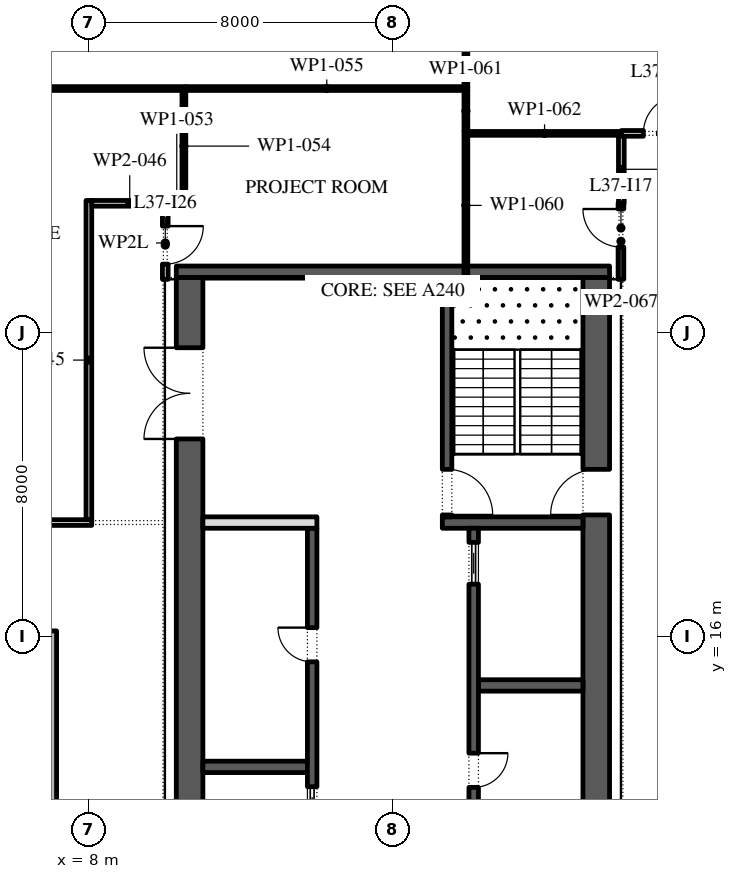
"""IFC4 building model, lengths in metres.
Left out: names, types, materials, properties, quantities, classifications, styles, units other than length and angle.
Written with IfcOpenShell. Run it as: python <this file> out.ifc"""

import sys

from ifc_helpers import new_model, si_unit, direction, frame, frame_2d, origin, place, context, subcontext, project, spatial, polyline, rectangle, outline, extrude, element, fill, save


model = new_model("IFC4")
c1 = context("Model", 3, precision=1e-05, world=origin(), true_north=direction((0.0, 1.0)))
c2 = subcontext(c1, "Body", "Model", "MODEL_VIEW")
j1 = project(units=[si_unit("LENGTHUNIT", "METRE"), si_unit("PLANEANGLEUNIT", "RADIAN")], contexts=[c1])
p1 = place(None, origin())
s1 = spatial("IfcSite", under=j1, at=p1, CompositionType="ELEMENT")
p2 = place(p1, origin())
s2 = spatial("IfcBuilding", under=s1, at=p2, CompositionType="ELEMENT")
p3 = place(p2, frame((0.0, 0.0, 171.6)))
s3 = spatial("IfcBuildingStorey", under=s2, at=p3, CompositionType="ELEMENT", Elevation=171.6)
p4 = place(p3, origin())
e1 = element("IfcWall", 1, at=p4, inside=s3, PredefinedType="STANDARD", context=c2, shape_type="SweptSolid", body=[
    extrude(outline(polyline([(-7.15, -2.15), (7.15, -2.15), (7.15, 16.15), (-7.15, 16.15), (-7.15, -2.15)]), holes=[polyline([(-7.0, -2.0), (-7.0, 16.0), (7.0, 16.0), (7.0, -2.0), (-7.0, -2.0)])]), origin(), (0.0, 0.0, 1.0), 4.0),
])
p5 = place(p3, frame((33.157, -5.092, 0.0), z_axis=(0.0, 0.0, 1.0), x_axis=(-0.224950279389, 0.974370243697, 0.0)))
e2 = element("IfcWall", 2, at=p5, inside=s3, PredefinedType="STANDARD", context=c2, shape_type="SweptSolid", body=[
    extrude(rectangle(XDim=49.5, YDim=0.3, at=frame_2d((24.75, 0.0))), origin(), (0.0, 0.0, 1.0), 4.0),
])
p6 = place(p5, frame((2.207, 0.0, 0.0)))
e3 = element("IfcOpeningElement", 3, at=p6, cuts=e2, PredefinedType="OPENING", context=c2, shape_type="SweptSolid", body=[
    extrude(rectangle(XDim=2.4, YDim=3.125, at=frame_2d((1.2, 1.562))), frame((0.0, 0.16, 0.0), z_axis=(0.0, -1.0, 0.0), x_axis=(1.0, 0.0, 0.0)), (0.0, 0.0, 1.0), 0.32),
])
p7 = place(p5, frame((8.121, 0.0, 0.45)))
e4 = element("IfcOpeningElement", 4, at=p7, cuts=e2, PredefinedType="OPENING", context=c2, shape_type="SweptSolid", body=[
    extrude(rectangle(XDim=4.5, YDim=2.875, at=frame_2d((2.25, 1.438))), frame((0.0, 0.16, 0.0), z_axis=(0.0, -1.0, 0.0), x_axis=(1.0, 0.0, 0.0)), (0.0, 0.0, 1.0), 0.32),
])
p8 = place(p5, frame((15.236, 0.0, 0.45)))
e5 = element("IfcOpeningElement", 5, at=p8, cuts=e2, PredefinedType="OPENING", context=c2, shape_type="SweptSolid", body=[
    extrude(rectangle(XDim=4.5, YDim=2.875, at=frame_2d((2.25, 1.438))), frame((0.0, 0.16, 0.0), z_axis=(0.0, -1.0, 0.0), x_axis=(1.0, 0.0, 0.0)), (0.0, 0.0, 1.0), 0.32),
])
p9 = place(p5, frame((22.35, 0.0, 0.45)))
e6 = element("IfcOpeningElement", 6, at=p9, cuts=e2, PredefinedType="OPENING", context=c2, shape_type="SweptSolid", body=[
    extrude(rectangle(XDim=4.5, YDim=3.0, at=frame_2d((2.25, 1.5))), frame((0.0, 0.16, 0.0), z_axis=(0.0, -1.0, 0.0), x_axis=(1.0, 0.0, 0.0)), (0.0, 0.0, 1.0), 0.32),
])
p10 = place(p5, frame((30.514, 0.0, 0.0)))
e7 = element("IfcOpeningElement", 7, at=p10, cuts=e2, PredefinedType="OPENING", context=c2, shape_type="SweptSolid", body=[
    extrude(rectangle(XDim=2.4, YDim=3.45, at=frame_2d((1.2, 1.725))), frame((0.0, 0.16, 0.0), z_axis=(0.0, -1.0, 0.0), x_axis=(1.0, 0.0, 0.0)), (0.0, 0.0, 1.0), 0.32),
])
p11 = place(p5, frame((36.579, 0.0, 0.45)))
e8 = element("IfcOpeningElement", 8, at=p11, cuts=e2, PredefinedType="OPENING", context=c2, shape_type="SweptSolid", body=[
    extrude(rectangle(XDim=4.5, YDim=3.05, at=frame_2d((2.25, 1.525))), frame((0.0, 0.16, 0.0), z_axis=(0.0, -1.0, 0.0), x_axis=(1.0, 0.0, 0.0)), (0.0, 0.0, 1.0), 0.32),
])
p12 = place(p5, frame((43.693, 0.0, 0.45)))
e9 = element("IfcOpeningElement", 9, at=p12, cuts=e2, PredefinedType="OPENING", context=c2, shape_type="SweptSolid", body=[
    extrude(rectangle(XDim=4.5, YDim=3.05, at=frame_2d((2.25, 1.525))), frame((0.0, 0.16, 0.0), z_axis=(0.0, -1.0, 0.0), x_axis=(1.0, 0.0, 0.0)), (0.0, 0.0, 1.0), 0.32),
])
p13 = place(p3, frame((21.35, -2.45, 0.0), z_axis=(0.0, 0.0, 1.0), x_axis=(0.0, 1.0, 0.0)))
e10 = element("IfcWall", 10, at=p13, inside=s3, PredefinedType="SHEAR", context=c2, shape_type="SweptSolid", body=[
    extrude(rectangle(XDim=27.9, YDim=0.7, at=frame_2d((13.95, 0.0))), origin(), (0.0, 0.0, 1.0), 4.0),
])
p14 = place(p13, frame((5.05, 0.0, 0.0)))
e11 = element("IfcOpeningElement", 11, at=p14, cuts=e10, PredefinedType="OPENING", context=c2, shape_type="SweptSolid", body=[
    extrude(rectangle(XDim=1.2, YDim=2.1, at=frame_2d((0.6, 1.05))), frame((0.0, 0.36, 0.0), z_axis=(0.0, -1.0, 0.0), x_axis=(1.0, 0.0, 0.0)), (0.0, 0.0, 1.0), 0.72),
])
p15 = place(p13, frame((21.65, 0.0, 0.0)))
e12 = element("IfcOpeningElement", 12, at=p15, cuts=e10, PredefinedType="OPENING", context=c2, shape_type="SweptSolid", body=[
    extrude(rectangle(XDim=1.2, YDim=2.1, at=frame_2d((0.6, 1.05))), frame((0.0, 0.36, 0.0), z_axis=(0.0, -1.0, 0.0), x_axis=(1.0, 0.0, 0.0)), (0.0, 0.0, 1.0), 0.72),
])
p16 = place(p3, frame((10.65, -2.45, 0.0), z_axis=(0.0, 0.0, 1.0), x_axis=(0.0, 1.0, 0.0)))
e13 = element("IfcWall", 13, at=p16, inside=s3, PredefinedType="SHEAR", context=c2, shape_type="SweptSolid", body=[
    extrude(rectangle(XDim=27.9, YDim=0.7, at=frame_2d((13.95, 0.0))), origin(), (0.0, 0.0, 1.0), 4.0),
])
p17 = place(p16, frame((23.65, 0.0, 0.0)))
e14 = element("IfcOpeningElement", 14, at=p17, cuts=e13, PredefinedType="OPENING", context=c2, shape_type="SweptSolid", body=[
    extrude(rectangle(XDim=2.4, YDim=2.1, at=frame_2d((1.2, 1.05))), frame((0.0, 0.36, 0.0), z_axis=(0.0, -1.0, 0.0), x_axis=(1.0, 0.0, 0.0)), (0.0, 0.0, 1.0), 0.72),
])
p18 = place(p16, frame((0.788, 0.0, 0.0)))
e15 = element("IfcOpeningElement", 15, at=p18, cuts=e13, PredefinedType="OPENING", context=c2, shape_type="SweptSolid", body=[
    extrude(rectangle(XDim=0.9, YDim=2.1, at=frame_2d((0.45, 1.05))), frame((0.0, 0.36, 0.0), z_axis=(0.0, -1.0, 0.0), x_axis=(1.0, 0.0, 0.0)), (0.0, 0.0, 1.0), 0.72),
])
p19 = place(p16, frame((3.962, 0.0, 0.0)))
e16 = element("IfcOpeningElement", 16, at=p19, cuts=e13, PredefinedType="OPENING", context=c2, shape_type="SweptSolid", body=[
    extrude(rectangle(XDim=1.0, YDim=2.1, at=frame_2d((0.5, 1.05))), frame((0.0, 0.36, 0.0), z_axis=(0.0, -1.0, 0.0), x_axis=(1.0, 0.0, 0.0)), (0.0, 0.0, 1.0), 0.72),
])
p20 = place(p3, frame((10.3, 25.6, 0.0), z_axis=(0.0, 0.0, 1.0), x_axis=(1.0, 0.0, 0.0)))
e17 = element("IfcWall", 17, at=p20, inside=s3, PredefinedType="SHEAR", context=c2, shape_type="SweptSolid", body=[
    extrude(rectangle(XDim=11.4, YDim=0.3, at=frame_2d((5.7, 0.0))), origin(), (0.0, 0.0, 1.0), 4.0),
])
p21 = place(p3, frame((17.3, 19.0, 0.0), z_axis=(0.0, 0.0, 1.0), x_axis=(1.0, 0.0, 0.0)))
e18 = element("IfcWall", 18, at=p21, inside=s3, PredefinedType="SHEAR", context=c2, shape_type="SweptSolid", body=[
    extrude(rectangle(XDim=3.7, YDim=0.3, at=frame_2d((1.85, 0.0))), origin(), (0.0, 0.0, 1.0), 4.0),
])
p22 = place(p3, frame((17.425, 19.15, 0.0), z_axis=(0.0, 0.0, 1.0), x_axis=(0.0, 1.0, 0.0)))
e19 = element("IfcWall", 19, at=p22, inside=s3, PredefinedType="SHEAR", context=c2, shape_type="SweptSolid", body=[
    extrude(rectangle(XDim=6.3, YDim=0.25, at=frame_2d((3.15, 0.0))), origin(), (0.0, 0.0, 1.0), 4.0),
])
p23 = place(p22, frame((0.05, 0.0, 0.0)))
e20 = element("IfcOpeningElement", 20, at=p23, cuts=e19, PredefinedType="OPENING", context=c2, shape_type="SweptSolid", body=[
    extrude(rectangle(XDim=1.2, YDim=2.1, at=frame_2d((0.6, 1.05))), frame((0.0, 0.135, 0.0), z_axis=(0.0, -1.0, 0.0), x_axis=(1.0, 0.0, 0.0)), (0.0, 0.0, 1.0), 0.27),
])
p24 = place(p3, frame((18.25, 14.714, 0.0), z_axis=(0.0, 0.0, 1.0), x_axis=(1.0, 0.0, 0.0)))
e21 = element("IfcWall", 21, at=p24, inside=s3, PredefinedType="SHEAR", context=c2, shape_type="SweptSolid", body=[
    extrude(rectangle(XDim=2.75, YDim=0.3, at=frame_2d((1.375, 0.0))), origin(), (0.0, 0.0, 1.0), 4.0),
])
p25 = place(p3, frame((18.125, 4.15, 0.0), z_axis=(0.0, 0.0, 1.0), x_axis=(0.0, 1.0, 0.0)))
e22 = element("IfcWall", 22, at=p25, inside=s3, PredefinedType="SHEAR", context=c2, shape_type="SweptSolid", body=[
    extrude(rectangle(XDim=14.7, YDim=0.25, at=frame_2d((7.35, 0.0))), origin(), (0.0, 0.0, 1.0), 4.0),
])
p26 = place(p25, frame((3.746, 0.0, 0.0)))
e23 = element("IfcOpeningElement", 23, at=p26, cuts=e22, PredefinedType="OPENING", context=c2, shape_type="SweptSolid", body=[
    extrude(rectangle(XDim=0.9, YDim=2.1, at=frame_2d((0.45, 1.05))), frame((0.0, 0.135, 0.0), z_axis=(0.0, -1.0, 0.0), x_axis=(1.0, 0.0, 0.0)), (0.0, 0.0, 1.0), 0.27),
])
p27 = place(p25, frame((7.882, 0.0, 0.0)))
e24 = element("IfcOpeningElement", 24, at=p27, cuts=e22, PredefinedType="OPENING", context=c2, shape_type="SweptSolid", body=[
    extrude(rectangle(XDim=0.9, YDim=2.1, at=frame_2d((0.45, 1.05))), frame((0.0, 0.135, 0.0), z_axis=(0.0, -1.0, 0.0), x_axis=(1.0, 0.0, 0.0)), (0.0, 0.0, 1.0), 0.27),
])
p28 = place(p25, frame((0.371, 0.0, 0.0)))
e25 = element("IfcOpeningElement", 25, at=p28, cuts=e22, PredefinedType="OPENING", context=c2, shape_type="SweptSolid", body=[
    extrude(rectangle(XDim=1.1, YDim=2.1, at=frame_2d((0.55, 1.05))), frame((0.0, 0.135, 0.0), z_axis=(0.0, -1.0, 0.0), x_axis=(1.0, 0.0, 0.0)), (0.0, 0.0, 1.0), 0.27),
])
p29 = place(p25, frame((13.229, 0.0, 0.0)))
e26 = element("IfcOpeningElement", 26, at=p29, cuts=e22, PredefinedType="OPENING", context=c2, shape_type="SweptSolid", body=[
    extrude(rectangle(XDim=1.1, YDim=2.1, at=frame_2d((0.55, 1.05))), frame((0.0, 0.135, 0.0), z_axis=(0.0, -1.0, 0.0), x_axis=(1.0, 0.0, 0.0)), (0.0, 0.0, 1.0), 0.27),
])
p30 = place(p3, frame((11.0, 12.571, 0.0), z_axis=(0.0, 0.0, 1.0), x_axis=(1.0, 0.0, 0.0)))
e27 = element("IfcWall", 27, at=p30, inside=s3, PredefinedType="SHEAR", context=c2, shape_type="SweptSolid", body=[
    extrude(rectangle(XDim=2.75, YDim=0.3, at=frame_2d((1.375, 0.0))), origin(), (0.0, 0.0, 1.0), 4.0),
])
p31 = place(p3, frame((13.875, -2.45, 0.0), z_axis=(0.0, 0.0, 1.0), x_axis=(0.0, 1.0, 0.0)))
e28 = element("IfcWall", 28, at=p31, inside=s3, PredefinedType="SHEAR", context=c2, shape_type="SweptSolid", body=[
    extrude(rectangle(XDim=21.3, YDim=0.25, at=frame_2d((10.65, 0.0))), origin(), (0.0, 0.0, 1.0), 4.0),
])
p32 = place(p31, frame((17.786, 0.0, 0.0)))
e29 = element("IfcOpeningElement", 29, at=p32, cuts=e28, PredefinedType="OPENING", context=c2, shape_type="SweptSolid", body=[
    extrude(rectangle(XDim=0.9, YDim=2.1, at=frame_2d((0.45, 1.05))), frame((0.0, 0.135, 0.0), z_axis=(0.0, -1.0, 0.0), x_axis=(1.0, 0.0, 0.0)), (0.0, 0.0, 1.0), 0.27),
])
p33 = place(p31, frame((6.971, 0.0, 0.0)))
e30 = element("IfcOpeningElement", 30, at=p33, cuts=e28, PredefinedType="OPENING", context=c2, shape_type="SweptSolid", body=[
    extrude(rectangle(XDim=1.1, YDim=2.1, at=frame_2d((0.55, 1.05))), frame((0.0, 0.135, 0.0), z_axis=(0.0, -1.0, 0.0), x_axis=(1.0, 0.0, 0.0)), (0.0, 0.0, 1.0), 0.27),
])
p34 = place(p31, frame((9.114, 0.0, 0.0)))
e31 = element("IfcOpeningElement", 31, at=p34, cuts=e28, PredefinedType="OPENING", context=c2, shape_type="SweptSolid", body=[
    extrude(rectangle(XDim=1.1, YDim=2.1, at=frame_2d((0.55, 1.05))), frame((0.0, 0.135, 0.0), z_axis=(0.0, -1.0, 0.0), x_axis=(1.0, 0.0, 0.0)), (0.0, 0.0, 1.0), 0.27),
])
p35 = place(p31, frame((11.257, 0.0, 0.0)))
e32 = element("IfcOpeningElement", 32, at=p35, cuts=e28, PredefinedType="OPENING", context=c2, shape_type="SweptSolid", body=[
    extrude(rectangle(XDim=1.1, YDim=2.1, at=frame_2d((0.55, 1.05))), frame((0.0, 0.135, 0.0), z_axis=(0.0, -1.0, 0.0), x_axis=(1.0, 0.0, 0.0)), (0.0, 0.0, 1.0), 0.27),
])
p36 = place(p31, frame((13.4, 0.0, 0.0)))
e33 = element("IfcOpeningElement", 33, at=p36, cuts=e28, PredefinedType="OPENING", context=c2, shape_type="SweptSolid", body=[
    extrude(rectangle(XDim=1.1, YDim=2.1, at=frame_2d((0.55, 1.05))), frame((0.0, 0.135, 0.0), z_axis=(0.0, -1.0, 0.0), x_axis=(1.0, 0.0, 0.0)), (0.0, 0.0, 1.0), 0.27),
])
p37 = place(p3, frame((11.0, 19.0, 0.0), z_axis=(0.0, 0.0, 1.0), x_axis=(1.0, 0.0, 0.0)))
e34 = element("IfcWall", 34, at=p37, inside=s3, PredefinedType="PARTITIONING", context=c2, shape_type="SweptSolid", body=[
    extrude(rectangle(XDim=3.0, YDim=0.3, at=frame_2d((1.5, 0.0))), origin(), (0.0, 0.0, 1.0), 4.0),
])
p38 = place(p3, frame((1.025, 19.0, 0.0), z_axis=(0.0, 0.0, 1.0), x_axis=(1.0, 0.0, 0.0)))
e35 = element("IfcWall", 35, at=p38, inside=s3, PredefinedType="PARTITIONING", context=c2, shape_type="SweptSolid", body=[
    extrude(rectangle(XDim=7.05, YDim=0.15, at=frame_2d((3.525, 0.0))), origin(), (0.0, 0.0, 1.0), 4.0),
])
p39 = place(p3, frame((1.175, 30.42, 0.0), z_axis=(0.0, 0.0, 1.0), x_axis=(1.0, 0.0, 0.0)))
e36 = element("IfcWall", 36, at=p39, inside=s3, PredefinedType="PARTITIONING", context=c2, shape_type="SweptSolid", body=[
    extrude(rectangle(XDim=9.375, YDim=0.1, at=frame_2d((4.688, 0.0))), origin(), (0.0, 0.0, 1.0), 4.0),
])
p40 = place(p3, frame((8.0, 19.075, 0.0), z_axis=(0.0, 0.0, 1.0), x_axis=(0.0, 1.0, 0.0)))
e37 = element("IfcWall", 37, at=p40, inside=s3, PredefinedType="PARTITIONING", context=c2, shape_type="SweptSolid", body=[
    extrude(rectangle(XDim=8.4, YDim=0.15, at=frame_2d((4.2, 0.0))), origin(), (0.0, 0.0, 1.0), 4.0),
])
p41 = place(p3, frame((8.075, 27.4, 0.0), z_axis=(0.0, 0.0, 1.0), x_axis=(1.0, 0.0, 0.0)))
e38 = element("IfcWall", 38, at=p41, inside=s3, PredefinedType="PARTITIONING", context=c2, shape_type="SweptSolid", body=[
    extrude(rectangle(XDim=2.0, YDim=0.15, at=frame_2d((1.0, 0.0))), origin(), (0.0, 0.0, 1.0), 4.0),
])
p42 = place(p3, frame((10.01, 27.315, 0.0), z_axis=(0.0, 0.0, 1.0), x_axis=(0.0, -1.0, 0.0)))
e39 = element("IfcWall", 39, at=p42, inside=s3, PredefinedType="PARTITIONING", context=c2, shape_type="SweptSolid", body=[
    extrude(rectangle(XDim=1.915, YDim=0.15, at=frame_2d((0.958, 0.0))), origin(), (0.0, 0.0, 1.0), 3.02),
])
p43 = place(p42, frame((0.515, 0.0, 0.0)))
e40 = element("IfcOpeningElement", 40, at=p43, cuts=e39, PredefinedType="OPENING", context=c2, shape_type="SweptSolid", body=[
    extrude(rectangle(XDim=1.0, YDim=2.1, at=frame_2d((0.5, 1.05))), frame((0.0, 0.085, 0.0), z_axis=(0.0, -1.0, 0.0), x_axis=(1.0, 0.0, 0.0)), (0.0, 0.0, 1.0), 0.17),
])
p44 = place(p3, frame((10.55, 27.39, 0.0), z_axis=(0.0, 0.0, 1.0), x_axis=(-1.0, 0.0, 0.0)))
e41 = element("IfcWall", 41, at=p44, inside=s3, PredefinedType="PARTITIONING", context=c2, shape_type="SweptSolid", body=[
    extrude(rectangle(XDim=0.475, YDim=0.1, at=frame_2d((0.238, 0.0))), origin(), (0.0, 0.0, 1.0), 4.0),
])
p45 = place(p3, frame((10.5, 30.37, 0.0), z_axis=(0.0, 0.0, 1.0), x_axis=(0.0, -1.0, 0.0)))
e42 = element("IfcWall", 42, at=p45, inside=s3, PredefinedType="PARTITIONING", context=c2, shape_type="SweptSolid", body=[
    extrude(rectangle(XDim=2.93, YDim=0.1, at=frame_2d((1.465, 0.0))), origin(), (0.0, 0.0, 1.0), 4.0),
])
p46 = place(p3, frame((10.55, 30.42, 0.0), z_axis=(0.0, 0.0, 1.0), x_axis=(1.0, 0.0, 0.0)))
e43 = element("IfcWall", 43, at=p46, inside=s3, PredefinedType="PARTITIONING", context=c2, shape_type="SweptSolid", body=[
    extrude(rectangle(XDim=7.42, YDim=0.1, at=frame_2d((3.71, 0.0))), origin(), (0.0, 0.0, 1.0), 4.0),
])
p47 = place(p3, frame((17.92, 25.4, 0.0), z_axis=(0.0, 0.0, 1.0), x_axis=(0.0, 1.0, 0.0)))
e44 = element("IfcWall", 44, at=p47, inside=s3, PredefinedType="PARTITIONING", context=c2, shape_type="SweptSolid", body=[
    extrude(rectangle(XDim=3.89, YDim=0.1, at=frame_2d((1.945, 0.0))), origin(), (0.0, 0.0, 1.0), 4.0),
])
p48 = place(p3, frame((17.92, 29.29, 0.0), z_axis=(0.0, 0.0, 1.0), x_axis=(0.0, 1.0, 0.0)))
e45 = element("IfcWall", 45, at=p48, inside=s3, PredefinedType="PARTITIONING", context=c2, shape_type="SweptSolid", body=[
    extrude(rectangle(XDim=1.08, YDim=0.1, at=frame_2d((0.54, 0.0))), origin(), (0.0, 0.0, 1.0), 4.0),
])
p49 = place(p3, frame((17.97, 29.24, 0.0), z_axis=(0.0, 0.0, 1.0), x_axis=(1.0, 0.0, 0.0)))
e46 = element("IfcWall", 46, at=p49, inside=s3, PredefinedType="PARTITIONING", context=c2, shape_type="SweptSolid", body=[
    extrude(rectangle(XDim=4.04, YDim=0.1, at=frame_2d((2.02, 0.0))), origin(), (0.0, 0.0, 1.0), 4.0),
])
p50 = place(p3, frame((17.92, 30.47, 0.0), z_axis=(0.0, 0.0, 1.0), x_axis=(0.0, 1.0, 0.0)))
e47 = element("IfcWall", 47, at=p50, inside=s3, PredefinedType="PARTITIONING", context=c2, shape_type="SweptSolid", body=[
    extrude(rectangle(XDim=5.48, YDim=0.1, at=frame_2d((2.74, 0.0))), origin(), (0.0, 0.0, 1.0), 4.0),
])
p51 = place(p3, frame((22.0, 25.4, 0.0), z_axis=(0.0, 0.0, 1.0), x_axis=(0.0, 1.0, 0.0)))
e48 = element("IfcWall", 48, at=p51, inside=s3, PredefinedType="PARTITIONING", context=c2, shape_type="SweptSolid", body=[
    extrude(rectangle(XDim=2.0, YDim=0.15, at=frame_2d((1.0, 0.0))), origin(), (0.0, 0.0, 1.0), 4.0),
])
p52 = place(p51, frame((0.85, 0.0, 0.0)))
e49 = element("IfcOpeningElement", 49, at=p52, cuts=e48, PredefinedType="OPENING", context=c2, shape_type="SweptSolid", body=[
    extrude(rectangle(XDim=1.0, YDim=2.1, at=frame_2d((0.5, 1.05))), frame((0.0, 0.085, 0.0), z_axis=(0.0, -1.0, 0.0), x_axis=(1.0, 0.0, 0.0)), (0.0, 0.0, 1.0), 0.17),
])
p53 = place(p3, frame((22.01, 27.4, 0.0), z_axis=(0.0, 0.0, 1.0), x_axis=(0.0, 1.0, 0.0)))
e50 = element("IfcWall", 50, at=p53, inside=s3, PredefinedType="PARTITIONING", context=c2, shape_type="SweptSolid", body=[
    extrude(rectangle(XDim=1.79, YDim=0.15, at=frame_2d((0.895, 0.0))), origin(), (0.0, 0.0, 1.0), 4.0),
])
p54 = place(p3, frame((22.01, 29.24, 0.0), z_axis=(0.0, 0.0, 1.0), x_axis=(1.0, 0.0, 0.0)))
e51 = element("IfcWall", 51, at=p54, inside=s3, PredefinedType="PARTITIONING", context=c2, shape_type="SweptSolid", body=[
    extrude(rectangle(XDim=2.055, YDim=0.15, at=frame_2d((1.027, 0.0))), origin(), (0.0, 0.0, 1.0), 4.0),
])
p55 = place(p54, frame((0.58, 0.0, 0.0)))
e52 = element("IfcOpeningElement", 52, at=p55, cuts=e51, PredefinedType="OPENING", context=c2, shape_type="SweptSolid", body=[
    extrude(rectangle(XDim=1.0, YDim=2.1, at=frame_2d((0.5, 1.05))), frame((0.0, 0.085, 0.0), z_axis=(0.0, -1.0, 0.0), x_axis=(1.0, 0.0, 0.0)), (0.0, 0.0, 1.0), 0.17),
])
p56 = place(p27, frame((0.9, -0.2, 0.0), z_axis=(0.0, 0.0, 1.0), x_axis=(-1.0, 0.0, 0.0)))
e53 = element("IfcDoor", 53, at=p56, inside=s3, OperationType="SINGLE_SWING_RIGHT", PredefinedType="DOOR", context=c2, shape_type="SweptSolid", body=[
    extrude(rectangle(XDim=0.9, YDim=2.1, at=frame_2d((0.45, 1.05))), frame((0.0, -0.075, 0.0), z_axis=(0.0, -1.0, 0.0), x_axis=(1.0, 0.0, 0.0)), (0.0, 0.0, 1.0), 0.05),
])
fill(e24, e53)
p57 = place(p29, origin())
e54 = element("IfcDoor", 54, at=p57, inside=s3, OperationType="SLIDING_TO_LEFT", PredefinedType="DOOR", context=c2, shape_type="SweptSolid", body=[
    extrude(rectangle(XDim=1.1, YDim=2.1, at=frame_2d((0.55, 1.05))), frame((0.0, 0.025, 0.0), z_axis=(0.0, -1.0, 0.0), x_axis=(1.0, 0.0, 0.0)), (0.0, 0.0, 1.0), 0.05),
])
fill(e26, e54)
p58 = place(p32, origin())
e55 = element("IfcDoor", 55, at=p58, inside=s3, OperationType="SINGLE_SWING_LEFT", PredefinedType="DOOR", context=c2, shape_type="SweptSolid", body=[
    extrude(rectangle(XDim=0.9, YDim=2.1, at=frame_2d((0.45, 1.05))), frame((0.0, 0.125, 0.0), z_axis=(0.0, -1.0, 0.0), x_axis=(1.0, 0.0, 0.0)), (0.0, 0.0, 1.0), 0.05),
])
fill(e29, e55)
p59 = place(p36, origin())
e56 = element("IfcDoor", 56, at=p59, inside=s3, OperationType="SLIDING_TO_LEFT", PredefinedType="DOOR", context=c2, shape_type="SweptSolid", body=[
    extrude(rectangle(XDim=1.1, YDim=2.1, at=frame_2d((0.55, 1.05))), frame((0.0, 0.025, 0.0), z_axis=(0.0, -1.0, 0.0), x_axis=(1.0, 0.0, 0.0)), (0.0, 0.0, 1.0), 0.05),
])
fill(e33, e56)
p60 = place(p17, origin())
e57 = element("IfcDoor", 57, at=p60, inside=s3, OperationType="DOUBLE_DOOR_SINGLE_SWING", PredefinedType="DOOR", context=c2, shape_type="SweptSolid", body=[
    extrude(rectangle(XDim=2.4, YDim=2.1, at=frame_2d((1.2, 1.05))), frame((0.0, 0.025, 0.0), z_axis=(0.0, -1.0, 0.0), x_axis=(1.0, 0.0, 0.0)), (0.0, 0.0, 1.0), 0.05),
])
fill(e14, e57)
p61 = place(p23, frame((1.2, 0.0, 0.0), z_axis=(0.0, 0.0, 1.0), x_axis=(-1.0, 0.0, 0.0)))
e58 = element("IfcDoor", 58, at=p61, inside=s3, OperationType="SINGLE_SWING_LEFT", PredefinedType="DOOR", context=c2, shape_type="SweptSolid", body=[
    extrude(rectangle(XDim=1.2, YDim=2.1, at=frame_2d((0.6, 1.05))), frame((0.0, 0.025, 0.0), z_axis=(0.0, -1.0, 0.0), x_axis=(1.0, 0.0, 0.0)), (0.0, 0.0, 1.0), 0.05),
])
fill(e20, e58)
p62 = place(p15, origin())
e59 = element("IfcDoor", 59, at=p62, inside=s3, OperationType="SINGLE_SWING_RIGHT", PredefinedType="DOOR", context=c2, shape_type="SweptSolid", body=[
    extrude(rectangle(XDim=1.2, YDim=2.1, at=frame_2d((0.6, 1.05))), frame((0.0, 0.025, 0.0), z_axis=(0.0, -1.0, 0.0), x_axis=(1.0, 0.0, 0.0)), (0.0, 0.0, 1.0), 0.05),
])
fill(e12, e59)
p63 = place(p52, origin())
e60 = element("IfcDoor", 60, at=p63, inside=s3, OperationType="SINGLE_SWING_LEFT", PredefinedType="DOOR", context=c2, shape_type="SweptSolid", body=[
    extrude(rectangle(XDim=1.0, YDim=2.1, at=frame_2d((0.5, 1.05))), frame((0.0, 0.025, 0.0), z_axis=(0.0, -1.0, 0.0), x_axis=(1.0, 0.0, 0.0)), (0.0, 0.0, 1.0), 0.05),
])
fill(e49, e60)
p64 = place(p55, origin())
e61 = element("IfcDoor", 61, at=p64, inside=s3, OperationType="SINGLE_SWING_LEFT", PredefinedType="DOOR", context=c2, shape_type="SweptSolid", body=[
    extrude(rectangle(XDim=1.0, YDim=2.1, at=frame_2d((0.5, 1.05))), frame((0.0, 0.025, 0.0), z_axis=(0.0, -1.0, 0.0), x_axis=(1.0, 0.0, 0.0)), (0.0, 0.0, 1.0), 0.05),
])
fill(e52, e61)
p65 = place(p43, origin())
e62 = element("IfcDoor", 62, at=p65, inside=s3, OperationType="SINGLE_SWING_RIGHT", PredefinedType="DOOR", context=c2, shape_type="SweptSolid", body=[
    extrude(rectangle(XDim=1.0, YDim=2.1, at=frame_2d((0.5, 1.05))), frame((0.0, 0.025, 0.0), z_axis=(0.0, -1.0, 0.0), x_axis=(1.0, 0.0, 0.0)), (0.0, 0.0, 1.0), 0.05),
])
fill(e40, e62)
save(model, sys.argv[1])
